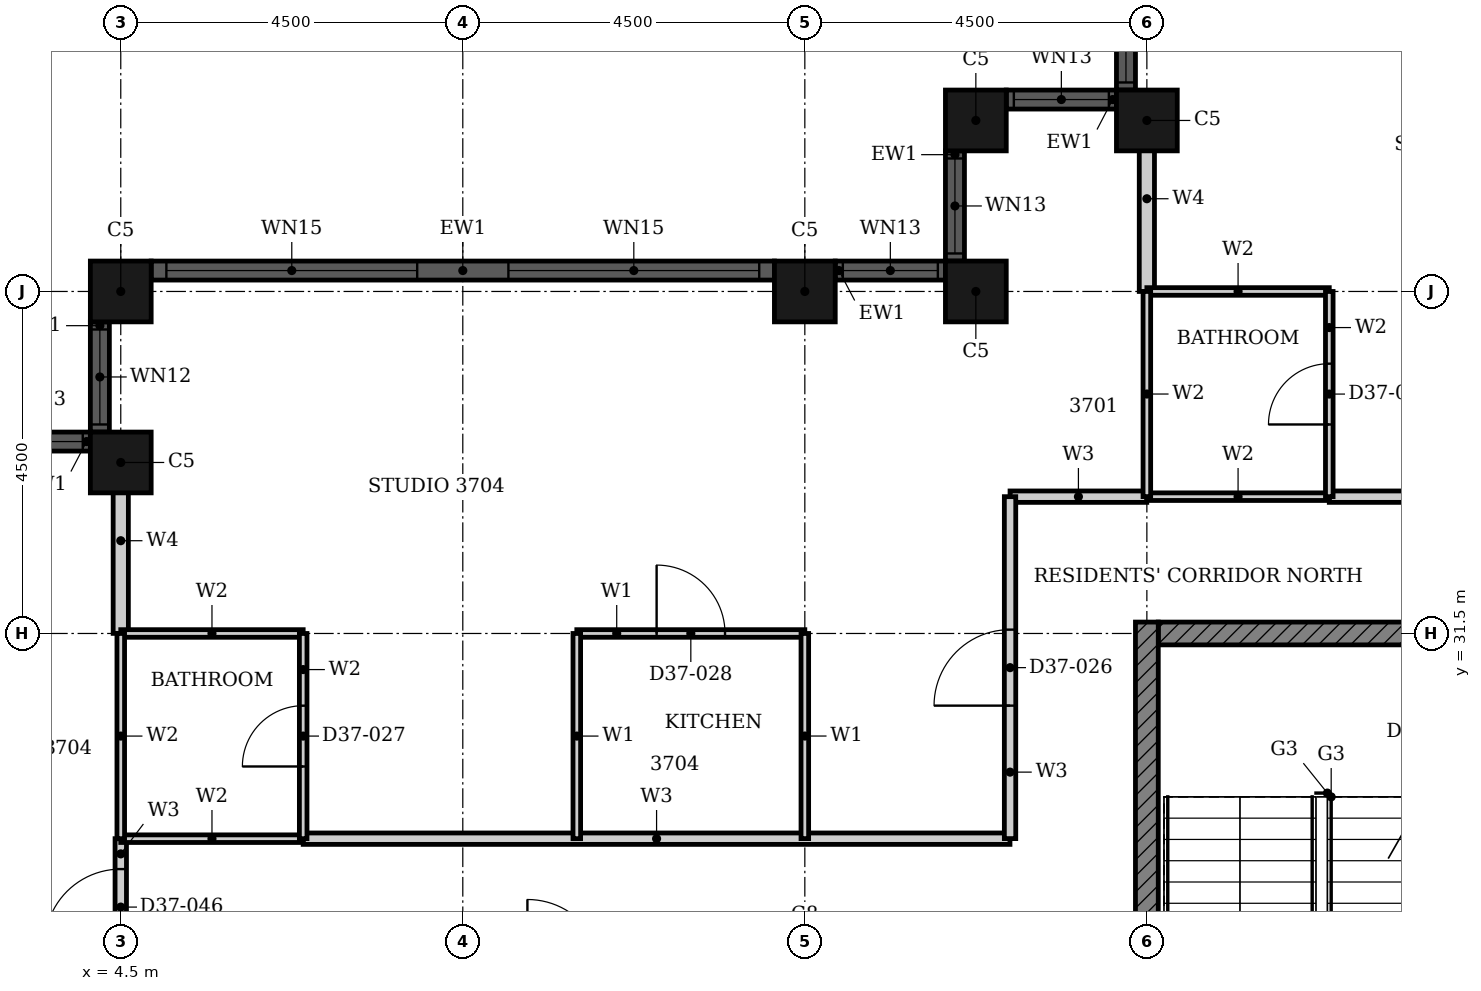
"""IFC4 building model, lengths in metres.
Left out: names, types, materials, properties, quantities, classifications, styles, units other than length and angle.
Written with IfcOpenShell. Run it as: python <this file> out.ifc"""

import sys

from ifc_helpers import new_model, si_unit, direction, frame, frame_2d, origin, origin_2d, place, context, subcontext, project, spatial, rectangle, hollow_rectangle, extrude, element, fill, save


model = new_model("IFC4")
c1 = context("Model", 3, precision=1e-05, world=origin(), true_north=direction((0.0, 1.0)))
c2 = subcontext(c1, "Body", "Model", "MODEL_VIEW")
j1 = project(units=[si_unit("LENGTHUNIT", "METRE"), si_unit("PLANEANGLEUNIT", "RADIAN")], contexts=[c1])
p1 = place(None, origin())
s1 = spatial("IfcSite", under=j1, at=p1, CompositionType="ELEMENT")
p2 = place(p1, origin())
s2 = spatial("IfcBuilding", under=s1, at=p2, CompositionType="ELEMENT")
p3 = place(p2, frame((0.0, 0.0, 150.6)))
s3 = spatial("IfcBuildingStorey", under=s2, at=p3, CompositionType="ELEMENT", Elevation=150.6)
for number, where, z_axis, x_axis in (
    (1, (18.0, 38.25, 0.0), (0.0, 0.0, 1.0), (1.0, 0.0, 0.0)),
    (2, (15.75, 38.25, 0.0), (0.0, 0.0, 1.0), (1.0, 0.0, 0.0)),
    (3, (15.75, 36.0, 0.0), (0.0, 0.0, 1.0), (1.0, 0.0, 0.0)),
    (4, (13.5, 36.0, 0.0), (0.0, 0.0, 1.0), (1.0, 0.0, 0.0)),
    (5, (4.5, 36.0, 0.0), (0.0, 0.0, 1.0), (1.0, 0.0, 0.0)),
    (6, (4.5, 33.75, 0.0), (0.0, 0.0, 1.0), (1.0, 0.0, 0.0)),
):
    element("IfcColumn", number, at=place(p3, frame(where, z_axis=z_axis, x_axis=x_axis)), inside=s3, PredefinedType="COLUMN", context=c2, shape_type="SweptSolid", body=[
        extrude(hollow_rectangle(XDim=0.8, YDim=0.8, WallThickness=0.025, at=origin_2d()), origin(), (0.0, 0.0, 1.0), 3.7),
    ])
p4 = place(p3, frame((17.725, 40.1, 0.0), z_axis=(0.0, 0.0, 1.0), x_axis=(0.0, -1.0, 0.0)))
e7 = element("IfcWall", 7, at=p4, inside=s3, PredefinedType="SOLIDWALL", context=c2, shape_type="SweptSolid", body=[
    extrude(rectangle(XDim=1.45, YDim=0.25, at=frame_2d((0.725, 0.0))), origin(), (0.0, 0.0, 1.0), 3.7),
])
p5 = place(p4, frame((0.1, 0.0, 0.9)))
e8 = element("IfcOpeningElement", 8, at=p5, cuts=e7, PredefinedType="OPENING", context=c2, shape_type="SweptSolid", body=[
    extrude(rectangle(XDim=1.25, YDim=1.85, at=frame_2d((0.625, 0.925))), frame((0.0, 0.135, 0.0), z_axis=(0.0, -1.0, 0.0), x_axis=(1.0, 0.0, 0.0)), (0.0, 0.0, 1.0), 0.27),
])
p6 = place(p3, frame((17.6, 38.525, 0.0), z_axis=(0.0, 0.0, 1.0), x_axis=(-1.0, 0.0, 0.0)))
e9 = element("IfcWall", 9, at=p6, inside=s3, PredefinedType="SOLIDWALL", context=c2, shape_type="SweptSolid", body=[
    extrude(rectangle(XDim=1.45, YDim=0.25, at=frame_2d((0.725, 0.0))), origin(), (0.0, 0.0, 1.0), 3.7),
])
p7 = place(p6, frame((0.1, 0.0, 0.9)))
e10 = element("IfcOpeningElement", 10, at=p7, cuts=e9, PredefinedType="OPENING", context=c2, shape_type="SweptSolid", body=[
    extrude(rectangle(XDim=1.25, YDim=1.85, at=frame_2d((0.625, 0.925))), frame((0.0, 0.135, 0.0), z_axis=(0.0, -1.0, 0.0), x_axis=(1.0, 0.0, 0.0)), (0.0, 0.0, 1.0), 0.27),
])
p8 = place(p3, frame((15.475, 37.85, 0.0), z_axis=(0.0, 0.0, 1.0), x_axis=(0.0, -1.0, 0.0)))
e11 = element("IfcWall", 11, at=p8, inside=s3, PredefinedType="SOLIDWALL", context=c2, shape_type="SweptSolid", body=[
    extrude(rectangle(XDim=1.45, YDim=0.25, at=frame_2d((0.725, 0.0))), origin(), (0.0, 0.0, 1.0), 3.7),
])
p9 = place(p8, frame((0.1, 0.0, 0.9)))
e12 = element("IfcOpeningElement", 12, at=p9, cuts=e11, PredefinedType="OPENING", context=c2, shape_type="SweptSolid", body=[
    extrude(rectangle(XDim=1.25, YDim=1.85, at=frame_2d((0.625, 0.925))), frame((0.0, 0.135, 0.0), z_axis=(0.0, -1.0, 0.0), x_axis=(1.0, 0.0, 0.0)), (0.0, 0.0, 1.0), 0.27),
])
p10 = place(p3, frame((15.35, 36.275, 0.0), z_axis=(0.0, 0.0, 1.0), x_axis=(-1.0, 0.0, 0.0)))
e13 = element("IfcWall", 13, at=p10, inside=s3, PredefinedType="SOLIDWALL", context=c2, shape_type="SweptSolid", body=[
    extrude(rectangle(XDim=1.45, YDim=0.25, at=frame_2d((0.725, 0.0))), origin(), (0.0, 0.0, 1.0), 3.7),
])
p11 = place(p10, frame((0.1, 0.0, 0.9)))
e14 = element("IfcOpeningElement", 14, at=p11, cuts=e13, PredefinedType="OPENING", context=c2, shape_type="SweptSolid", body=[
    extrude(rectangle(XDim=1.25, YDim=1.85, at=frame_2d((0.625, 0.925))), frame((0.0, 0.135, 0.0), z_axis=(0.0, -1.0, 0.0), x_axis=(1.0, 0.0, 0.0)), (0.0, 0.0, 1.0), 0.27),
])
p12 = place(p3, frame((13.1, 36.275, 0.0), z_axis=(0.0, 0.0, 1.0), x_axis=(-1.0, 0.0, 0.0)))
e15 = element("IfcWall", 15, at=p12, inside=s3, PredefinedType="SOLIDWALL", context=c2, shape_type="SweptSolid", body=[
    extrude(rectangle(XDim=8.2, YDim=0.25, at=frame_2d((4.1, 0.0))), origin(), (0.0, 0.0, 1.0), 3.7),
])
p13 = place(p12, frame((0.2, 0.0, 0.45)))
e16 = element("IfcOpeningElement", 16, at=p13, cuts=e15, PredefinedType="OPENING", context=c2, shape_type="SweptSolid", body=[
    extrude(rectangle(XDim=3.3, YDim=2.3, at=frame_2d((1.65, 1.15))), frame((0.0, 0.135, 0.0), z_axis=(0.0, -1.0, 0.0), x_axis=(1.0, 0.0, 0.0)), (0.0, 0.0, 1.0), 0.27),
])
p14 = place(p12, frame((4.7, 0.0, 0.45)))
e17 = element("IfcOpeningElement", 17, at=p14, cuts=e15, PredefinedType="OPENING", context=c2, shape_type="SweptSolid", body=[
    extrude(rectangle(XDim=3.3, YDim=2.3, at=frame_2d((1.65, 1.15))), frame((0.0, 0.135, 0.0), z_axis=(0.0, -1.0, 0.0), x_axis=(1.0, 0.0, 0.0)), (0.0, 0.0, 1.0), 0.27),
])
p15 = place(p3, frame((4.225, 35.6, 0.0), z_axis=(0.0, 0.0, 1.0), x_axis=(0.0, -1.0, 0.0)))
e18 = element("IfcWall", 18, at=p15, inside=s3, PredefinedType="SOLIDWALL", context=c2, shape_type="SweptSolid", body=[
    extrude(rectangle(XDim=1.45, YDim=0.25, at=frame_2d((0.725, 0.0))), origin(), (0.0, 0.0, 1.0), 3.7),
])
p16 = place(p15, frame((0.1, 0.0, 0.9)))
e19 = element("IfcOpeningElement", 19, at=p16, cuts=e18, PredefinedType="OPENING", context=c2, shape_type="SweptSolid", body=[
    extrude(rectangle(XDim=1.25, YDim=2.08, at=frame_2d((0.625, 1.04))), frame((0.0, 0.135, 0.0), z_axis=(0.0, -1.0, 0.0), x_axis=(1.0, 0.0, 0.0)), (0.0, 0.0, 1.0), 0.27),
])
p17 = place(p3, frame((4.1, 34.025, 0.0), z_axis=(0.0, 0.0, 1.0), x_axis=(-1.0, 0.0, 0.0)))
e20 = element("IfcWall", 20, at=p17, inside=s3, PredefinedType="SOLIDWALL", context=c2, shape_type="SweptSolid", body=[
    extrude(rectangle(XDim=1.45, YDim=0.25, at=frame_2d((0.725, 0.0))), origin(), (0.0, 0.0, 1.0), 3.7),
])
p18 = place(p17, frame((0.1, 0.0, 0.9)))
e21 = element("IfcOpeningElement", 21, at=p18, cuts=e20, PredefinedType="OPENING", context=c2, shape_type="SweptSolid", body=[
    extrude(rectangle(XDim=1.25, YDim=1.85, at=frame_2d((0.625, 0.925))), frame((0.0, 0.135, 0.0), z_axis=(0.0, -1.0, 0.0), x_axis=(1.0, 0.0, 0.0)), (0.0, 0.0, 1.0), 0.27),
])
p19 = place(p3, frame((18.15, 31.5, 0.0), z_axis=(0.0, 0.0, 1.0), x_axis=(1.0, 0.0, 0.0)))
e22 = element("IfcWall", 22, at=p19, inside=s3, PredefinedType="SHEAR", context=c2, shape_type="SweptSolid", body=[
    extrude(rectangle(XDim=9.368, YDim=0.3, at=frame_2d((4.684, 0.0))), origin(), (0.0, 0.0, 1.0), 3.4),
])
p20 = place(p19, frame((4.736, 0.0, 0.0)))
e23 = element("IfcOpeningElement", 23, at=p20, cuts=e22, PredefinedType="OPENING", context=c2, shape_type="SweptSolid", body=[
    extrude(rectangle(XDim=1.8, YDim=2.1, at=frame_2d((0.9, 1.05))), frame((0.0, 0.16, 0.0), z_axis=(0.0, -1.0, 0.0), x_axis=(1.0, 0.0, 0.0)), (0.0, 0.0, 1.0), 0.32),
])
p21 = place(p3, frame((18.0, 22.35, 0.0), z_axis=(0.0, 0.0, 1.0), x_axis=(0.0, 1.0, 0.0)))
e24 = element("IfcWall", 24, at=p21, inside=s3, PredefinedType="SHEAR", context=c2, shape_type="SweptSolid", body=[
    extrude(rectangle(XDim=9.3, YDim=0.3, at=frame_2d((4.65, 0.0))), origin(), (0.0, 0.0, 1.0), 3.4),
])
p22 = place(p3, frame((6.9, 28.8, 0.0), z_axis=(0.0, 0.0, 1.0), x_axis=(1.0, 0.0, 0.0)))
e25 = element("IfcWall", 25, at=p22, inside=s3, PredefinedType="PARTITIONING", context=c2, shape_type="SweptSolid", body=[
    extrude(rectangle(XDim=9.299, YDim=0.15, at=frame_2d((4.649, 0.0))), origin(), (0.0, 0.0, 1.0), 3.4),
])
p23 = place(p3, frame((20.4, 33.3, 0.0), z_axis=(0.0, 0.0, 1.0), x_axis=(1.0, 0.0, 0.0)))
e26 = element("IfcWall", 26, at=p23, inside=s3, PredefinedType="PARTITIONING", context=c2, shape_type="SweptSolid", body=[
    extrude(rectangle(XDim=6.6, YDim=0.15, at=frame_2d((3.3, 0.0))), origin(), (0.0, 0.0, 1.0), 3.4),
])
p24 = place(p23, frame((1.3, 0.0, 0.0)))
e27 = element("IfcOpeningElement", 27, at=p24, cuts=e26, PredefinedType="OPENING", context=c2, shape_type="SweptSolid", body=[
    extrude(rectangle(XDim=1.0, YDim=2.2, at=frame_2d((0.5, 1.1))), frame((0.0, 0.085, 0.0), z_axis=(0.0, -1.0, 0.0), x_axis=(1.0, 0.0, 0.0)), (0.0, 0.0, 1.0), 0.17),
])
p25 = place(p3, frame((16.2, 33.3, 0.0), z_axis=(0.0, 0.0, 1.0), x_axis=(1.0, 0.0, 0.0)))
e28 = element("IfcWall", 28, at=p25, inside=s3, PredefinedType="PARTITIONING", context=c2, shape_type="SweptSolid", body=[
    extrude(rectangle(XDim=1.799, YDim=0.15, at=frame_2d((0.899, 0.0))), origin(), (0.0, 0.0, 1.0), 3.4),
])
p26 = place(p3, frame((16.2, 28.801, 0.0), z_axis=(0.0, 0.0, 1.0), x_axis=(0.0, 1.0, 0.0)))
e29 = element("IfcWall", 29, at=p26, inside=s3, PredefinedType="PARTITIONING", context=c2, shape_type="SweptSolid", body=[
    extrude(rectangle(XDim=4.499, YDim=0.15, at=frame_2d((2.25, 0.0))), origin(), (0.0, 0.0, 1.0), 3.4),
])
p27 = place(p26, frame((1.75, 0.0, 0.0)))
e30 = element("IfcOpeningElement", 30, at=p27, cuts=e29, PredefinedType="OPENING", context=c2, shape_type="SweptSolid", body=[
    extrude(rectangle(XDim=1.0, YDim=2.2, at=frame_2d((0.5, 1.1))), frame((0.0, 0.085, 0.0), z_axis=(0.0, -1.0, 0.0), x_axis=(1.0, 0.0, 0.0)), (0.0, 0.0, 1.0), 0.17),
])
p28 = place(p3, frame((4.5, 27.0, 0.0), z_axis=(0.0, 0.0, 1.0), x_axis=(0.0, 1.0, 0.0)))
e31 = element("IfcWall", 31, at=p28, inside=s3, PredefinedType="PARTITIONING", context=c2, shape_type="SweptSolid", body=[
    extrude(rectangle(XDim=1.8, YDim=0.15, at=frame_2d((0.9, 0.0))), origin(), (0.0, 0.0, 1.0), 3.4),
])
p29 = place(p28, frame((0.4, 0.0, 0.0)))
e32 = element("IfcOpeningElement", 32, at=p29, cuts=e31, PredefinedType="OPENING", context=c2, shape_type="SweptSolid", body=[
    extrude(rectangle(XDim=1.0, YDim=2.2, at=frame_2d((0.5, 1.1))), frame((0.0, 0.085, 0.0), z_axis=(0.0, -1.0, 0.0), x_axis=(1.0, 0.0, 0.0)), (0.0, 0.0, 1.0), 0.17),
])
p30 = place(p3, frame((10.5, 31.5, 0.0), z_axis=(0.0, 0.0, 1.0), x_axis=(1.0, 0.0, 0.0)))
e33 = element("IfcWall", 33, at=p30, inside=s3, PredefinedType="PARTITIONING", context=c2, shape_type="SweptSolid", body=[
    extrude(rectangle(XDim=3.0, YDim=0.1, at=frame_2d((1.5, 0.0))), origin(), (0.0, 0.0, 1.0), 2.68),
])
p31 = place(p30, frame((1.05, 0.0, 0.0)))
e34 = element("IfcOpeningElement", 34, at=p31, cuts=e33, PredefinedType="OPENING", context=c2, shape_type="SweptSolid", body=[
    extrude(rectangle(XDim=0.9, YDim=2.1, at=frame_2d((0.45, 1.05))), frame((0.0, 0.06, 0.0), z_axis=(0.0, -1.0, 0.0), x_axis=(1.0, 0.0, 0.0)), (0.0, 0.0, 1.0), 0.12),
])
p32 = place(p3, frame((10.5, 28.8, 0.0), z_axis=(0.0, 0.0, 1.0), x_axis=(0.0, 1.0, 0.0)))
e35 = element("IfcWall", 35, at=p32, inside=s3, PredefinedType="PARTITIONING", context=c2, shape_type="SweptSolid", body=[
    extrude(rectangle(XDim=2.7, YDim=0.1, at=frame_2d((1.35, 0.0))), origin(), (0.0, 0.0, 1.0), 3.4),
])
p33 = place(p3, frame((13.5, 28.801, 0.0), z_axis=(0.0, 0.0, 1.0), x_axis=(0.0, 1.0, 0.0)))
e36 = element("IfcWall", 36, at=p33, inside=s3, PredefinedType="PARTITIONING", context=c2, shape_type="SweptSolid", body=[
    extrude(rectangle(XDim=2.699, YDim=0.1, at=frame_2d((1.35, 0.0))), origin(), (0.0, 0.0, 1.0), 2.48),
])
p34 = place(p3, frame((18.0, 36.0, 0.0), z_axis=(0.0, 0.0, 1.0), x_axis=(0.0, 1.0, 0.0)))
e37 = element("IfcWall", 37, at=p34, inside=s3, PredefinedType="PARTITIONING", context=c2, shape_type="SweptSolid", body=[
    extrude(rectangle(XDim=2.44, YDim=0.2, at=frame_2d((1.22, 0.0))), origin(), (0.0, 0.0, 1.0), 3.4),
])
p35 = place(p3, frame((4.5, 31.501, 0.0), z_axis=(0.0, 0.0, 1.0), x_axis=(0.0, 1.0, 0.0)))
e38 = element("IfcWall", 38, at=p35, inside=s3, PredefinedType="PARTITIONING", context=c2, shape_type="SweptSolid", body=[
    extrude(rectangle(XDim=2.439, YDim=0.2, at=frame_2d((1.219, 0.0))), origin(), (0.0, 0.0, 1.0), 3.4),
])
p36 = place(p3, frame((4.5, 28.8, 0.0), z_axis=(0.0, 0.0, 1.0), x_axis=(1.0, 0.0, 0.0)))
e39 = element("IfcWall", 39, at=p36, inside=s3, PredefinedType="PARTITIONING", context=c2, shape_type="SweptSolid", body=[
    extrude(rectangle(XDim=2.4, YDim=0.1, at=frame_2d((1.2, 0.0))), origin(), (0.0, 0.0, 1.0), 3.4),
])
p37 = place(p3, frame((4.5, 31.5, 0.0), z_axis=(0.0, 0.0, 1.0), x_axis=(1.0, 0.0, 0.0)))
e40 = element("IfcWall", 40, at=p37, inside=s3, PredefinedType="PARTITIONING", context=c2, shape_type="SweptSolid", body=[
    extrude(rectangle(XDim=2.4, YDim=0.1, at=frame_2d((1.2, 0.0))), origin(), (0.0, 0.0, 1.0), 2.68),
])
for number, where, z_axis, x_axis in (
    (41, (18.0, 33.3, 0.0), (0.0, 0.0, 1.0), (1.0, 0.0, 0.0)),
    (42, (18.0, 36.0, 0.0), (0.0, 0.0, 1.0), (1.0, 0.0, 0.0)),
):
    element("IfcWall", number, at=place(p3, frame(where, z_axis=z_axis, x_axis=x_axis)), inside=s3, PredefinedType="PARTITIONING", context=c2, shape_type="SweptSolid", body=[
        extrude(rectangle(XDim=2.4, YDim=0.1, at=frame_2d((1.2, 0.0))), origin(), (0.0, 0.0, 1.0), 3.4),
    ])
p38 = place(p3, frame((18.0, 33.301, 0.0), z_axis=(0.0, 0.0, 1.0), x_axis=(0.0, 1.0, 0.0)))
e43 = element("IfcWall", 43, at=p38, inside=s3, PredefinedType="PARTITIONING", context=c2, shape_type="SweptSolid", body=[
    extrude(rectangle(XDim=2.699, YDim=0.1, at=frame_2d((1.35, 0.0))), origin(), (0.0, 0.0, 1.0), 3.4),
])
p39 = place(p3, frame((20.4, 33.3, 0.0), z_axis=(0.0, 0.0, 1.0), x_axis=(0.0, 1.0, 0.0)))
e44 = element("IfcWall", 44, at=p39, inside=s3, PredefinedType="PARTITIONING", context=c2, shape_type="SweptSolid", body=[
    extrude(rectangle(XDim=2.7, YDim=0.1, at=frame_2d((1.35, 0.0))), origin(), (0.0, 0.0, 1.0), 3.4),
])
p40 = place(p39, frame((0.95, 0.0, 0.0)))
e45 = element("IfcOpeningElement", 45, at=p40, cuts=e44, PredefinedType="OPENING", context=c2, shape_type="SweptSolid", body=[
    extrude(rectangle(XDim=0.8, YDim=2.1, at=frame_2d((0.4, 1.05))), frame((0.0, 0.06, 0.0), z_axis=(0.0, -1.0, 0.0), x_axis=(1.0, 0.0, 0.0)), (0.0, 0.0, 1.0), 0.12),
])
p41 = place(p3, frame((4.5, 28.8, 0.0), z_axis=(0.0, 0.0, 1.0), x_axis=(0.0, 1.0, 0.0)))
e46 = element("IfcWall", 46, at=p41, inside=s3, PredefinedType="PARTITIONING", context=c2, shape_type="SweptSolid", body=[
    extrude(rectangle(XDim=2.7, YDim=0.1, at=frame_2d((1.35, 0.0))), origin(), (0.0, 0.0, 1.0), 3.4),
])
p42 = place(p3, frame((6.9, 28.8, 0.0), z_axis=(0.0, 0.0, 1.0), x_axis=(0.0, 1.0, 0.0)))
e47 = element("IfcWall", 47, at=p42, inside=s3, PredefinedType="PARTITIONING", context=c2, shape_type="SweptSolid", body=[
    extrude(rectangle(XDim=2.7, YDim=0.1, at=frame_2d((1.35, 0.0))), origin(), (0.0, 0.0, 1.0), 3.4),
])
p43 = place(p42, frame((0.95, 0.0, 0.0)))
e48 = element("IfcOpeningElement", 48, at=p43, cuts=e47, PredefinedType="OPENING", context=c2, shape_type="SweptSolid", body=[
    extrude(rectangle(XDim=0.8, YDim=2.1, at=frame_2d((0.4, 1.05))), frame((0.0, 0.06, 0.0), z_axis=(0.0, -1.0, 0.0), x_axis=(1.0, 0.0, 0.0)), (0.0, 0.0, 1.0), 0.12),
])
p44 = place(p5, origin())
e49 = element("IfcWindow", 49, at=p44, inside=s3, PartitioningType="SINGLE_PANEL", PredefinedType="WINDOW", context=c2, shape_type="SweptSolid", body=[
    extrude(rectangle(XDim=1.25, YDim=1.85, at=frame_2d((0.625, 0.925))), frame((0.0, 0.03, 0.0), z_axis=(0.0, -1.0, 0.0), x_axis=(1.0, 0.0, 0.0)), (0.0, 0.0, 1.0), 0.06),
])
fill(e8, e49)
p45 = place(p7, origin())
e50 = element("IfcWindow", 50, at=p45, inside=s3, PartitioningType="SINGLE_PANEL", PredefinedType="WINDOW", context=c2, shape_type="SweptSolid", body=[
    extrude(rectangle(XDim=1.25, YDim=1.85, at=frame_2d((0.625, 0.925))), frame((0.0, 0.03, 0.0), z_axis=(0.0, -1.0, 0.0), x_axis=(1.0, 0.0, 0.0)), (0.0, 0.0, 1.0), 0.06),
])
fill(e10, e50)
p46 = place(p9, origin())
e51 = element("IfcWindow", 51, at=p46, inside=s3, PartitioningType="SINGLE_PANEL", PredefinedType="WINDOW", context=c2, shape_type="SweptSolid", body=[
    extrude(rectangle(XDim=1.25, YDim=1.85, at=frame_2d((0.625, 0.925))), frame((0.0, 0.03, 0.0), z_axis=(0.0, -1.0, 0.0), x_axis=(1.0, 0.0, 0.0)), (0.0, 0.0, 1.0), 0.06),
])
fill(e12, e51)
p47 = place(p11, origin())
e52 = element("IfcWindow", 52, at=p47, inside=s3, PartitioningType="SINGLE_PANEL", PredefinedType="WINDOW", context=c2, shape_type="SweptSolid", body=[
    extrude(rectangle(XDim=1.25, YDim=1.85, at=frame_2d((0.625, 0.925))), frame((0.0, 0.03, 0.0), z_axis=(0.0, -1.0, 0.0), x_axis=(1.0, 0.0, 0.0)), (0.0, 0.0, 1.0), 0.06),
])
fill(e14, e52)
p48 = place(p13, origin())
e53 = element("IfcWindow", 53, at=p48, inside=s3, PartitioningType="SINGLE_PANEL", PredefinedType="WINDOW", context=c2, shape_type="SweptSolid", body=[
    extrude(rectangle(XDim=3.3, YDim=2.3, at=frame_2d((1.65, 1.15))), frame((0.0, 0.03, 0.0), z_axis=(0.0, -1.0, 0.0), x_axis=(1.0, 0.0, 0.0)), (0.0, 0.0, 1.0), 0.06),
])
fill(e16, e53)
p49 = place(p14, origin())
e54 = element("IfcWindow", 54, at=p49, inside=s3, PartitioningType="SINGLE_PANEL", PredefinedType="WINDOW", context=c2, shape_type="SweptSolid", body=[
    extrude(rectangle(XDim=3.3, YDim=2.3, at=frame_2d((1.65, 1.15))), frame((0.0, 0.03, 0.0), z_axis=(0.0, -1.0, 0.0), x_axis=(1.0, 0.0, 0.0)), (0.0, 0.0, 1.0), 0.06),
])
fill(e17, e54)
p50 = place(p16, origin())
e55 = element("IfcWindow", 55, at=p50, inside=s3, PartitioningType="SINGLE_PANEL", PredefinedType="WINDOW", context=c2, shape_type="SweptSolid", body=[
    extrude(rectangle(XDim=1.25, YDim=2.08, at=frame_2d((0.625, 1.04))), frame((0.0, 0.03, 0.0), z_axis=(0.0, -1.0, 0.0), x_axis=(1.0, 0.0, 0.0)), (0.0, 0.0, 1.0), 0.06),
])
fill(e19, e55)
p51 = place(p18, origin())
e56 = element("IfcWindow", 56, at=p51, inside=s3, PartitioningType="SINGLE_PANEL", PredefinedType="WINDOW", context=c2, shape_type="SweptSolid", body=[
    extrude(rectangle(XDim=1.25, YDim=1.85, at=frame_2d((0.625, 0.925))), frame((0.0, 0.03, 0.0), z_axis=(0.0, -1.0, 0.0), x_axis=(1.0, 0.0, 0.0)), (0.0, 0.0, 1.0), 0.06),
])
fill(e21, e56)
p52 = place(p40, origin())
e57 = element("IfcDoor", 57, at=p52, inside=s3, OperationType="SINGLE_SWING_LEFT", PredefinedType="DOOR", context=c2, shape_type="SweptSolid", body=[
    extrude(rectangle(XDim=0.8, YDim=2.1, at=frame_2d((0.4, 1.05))), frame((0.0, 0.025, 0.0), z_axis=(0.0, -1.0, 0.0), x_axis=(1.0, 0.0, 0.0)), (0.0, 0.0, 1.0), 0.05),
])
fill(e45, e57)
p53 = place(p27, origin())
e58 = element("IfcDoor", 58, at=p53, inside=s3, OperationType="SINGLE_SWING_LEFT", PredefinedType="DOOR", context=c2, shape_type="SweptSolid", body=[
    extrude(rectangle(XDim=1.0, YDim=2.2, at=frame_2d((0.5, 1.1))), frame((0.0, 0.025, 0.0), z_axis=(0.0, -1.0, 0.0), x_axis=(1.0, 0.0, 0.0)), (0.0, 0.0, 1.0), 0.05),
])
fill(e30, e58)
p54 = place(p43, origin())
e59 = element("IfcDoor", 59, at=p54, inside=s3, OperationType="SINGLE_SWING_RIGHT", PredefinedType="DOOR", context=c2, shape_type="SweptSolid", body=[
    extrude(rectangle(XDim=0.8, YDim=2.1, at=frame_2d((0.4, 1.05))), frame((0.0, 0.025, 0.0), z_axis=(0.0, -1.0, 0.0), x_axis=(1.0, 0.0, 0.0)), (0.0, 0.0, 1.0), 0.05),
])
fill(e48, e59)
p55 = place(p31, origin())
e60 = element("IfcDoor", 60, at=p55, inside=s3, OperationType="SINGLE_SWING_LEFT", PredefinedType="DOOR", context=c2, shape_type="SweptSolid", body=[
    extrude(rectangle(XDim=0.9, YDim=2.1, at=frame_2d((0.45, 1.05))), frame((0.0, 0.025, 0.0), z_axis=(0.0, -1.0, 0.0), x_axis=(1.0, 0.0, 0.0)), (0.0, 0.0, 1.0), 0.05),
])
fill(e34, e60)
p56 = place(p29, origin())
e61 = element("IfcDoor", 61, at=p56, inside=s3, OperationType="SINGLE_SWING_RIGHT", PredefinedType="DOOR", context=c2, shape_type="SweptSolid", body=[
    extrude(rectangle(XDim=1.0, YDim=2.2, at=frame_2d((0.5, 1.1))), frame((0.0, 0.025, 0.0), z_axis=(0.0, -1.0, 0.0), x_axis=(1.0, 0.0, 0.0)), (0.0, 0.0, 1.0), 0.05),
])
fill(e32, e61)
save(model, sys.argv[1])
